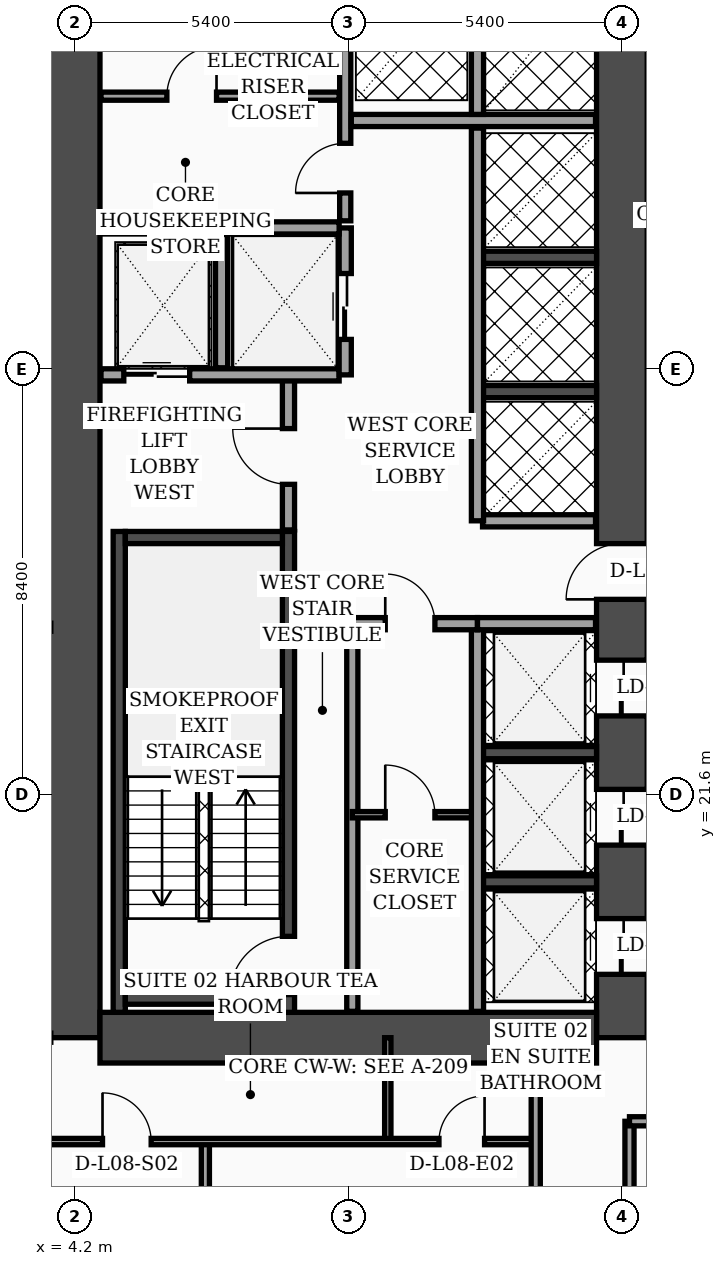
"""IFC4 building model, lengths in metres.
Left out: names, types, materials, properties, quantities, classifications, styles, units other than length and angle.
Written with IfcOpenShell. Run it as: python <this file> out.ifc"""

import sys

from ifc_helpers import new_model, si_unit, direction, frame, frame_2d, origin, place, context, subcontext, project, spatial, rectangle, extrude, element, fill, save


model = new_model("IFC4")
c1 = context("Model", 3, precision=1e-05, world=origin(), true_north=direction((0.0, 1.0)))
c2 = subcontext(c1, "Body", "Model", "MODEL_VIEW")
j1 = project(units=[si_unit("LENGTHUNIT", "METRE"), si_unit("PLANEANGLEUNIT", "RADIAN")], contexts=[c1])
p1 = place(None, origin())
s1 = spatial("IfcSite", under=j1, at=p1, CompositionType="ELEMENT")
p2 = place(p1, origin())
s2 = spatial("IfcBuilding", under=s1, at=p2, CompositionType="ELEMENT")
p3 = place(p2, frame((0.0, 0.0, 38.4)))
s3 = spatial("IfcBuildingStorey", under=s2, at=p3, CompositionType="ELEMENT", Elevation=38.4)
p4 = place(p3, frame((4.2, 16.8, 0.0), z_axis=(0.0, 0.0, 1.0), x_axis=(0.0, 1.0, 0.0)))
e1 = element("IfcWall", 1, at=p4, inside=s3, PredefinedType="SHEAR", context=c2, shape_type="SweptSolid", body=[
    extrude(rectangle(XDim=21.6, YDim=1.0, at=frame_2d((10.8, 0.0))), origin(), (0.0, 0.0, 1.0), 3.56),
])
p5 = place(p3, frame((15.0, 16.8, 0.0), z_axis=(0.0, 0.0, 1.0), x_axis=(0.0, 1.0, 0.0)))
e2 = element("IfcWall", 2, at=p5, inside=s3, PredefinedType="SHEAR", context=c2, shape_type="SweptSolid", body=[
    extrude(rectangle(XDim=21.6, YDim=1.0, at=frame_2d((10.8, 0.0))), origin(), (0.0, 0.0, 1.0), 3.56),
])
p6 = place(p5, frame((8.65, 0.0, 0.0)))
e3 = element("IfcOpeningElement", 3, at=p6, cuts=e2, PredefinedType="OPENING", context=c2, shape_type="SweptSolid", body=[
    extrude(rectangle(XDim=1.1, YDim=2.2, at=frame_2d((0.55, 1.1))), frame((0.0, 0.51, 0.0), z_axis=(0.0, -1.0, 0.0), x_axis=(1.0, 0.0, 0.0)), (0.0, 0.0, 1.0), 1.02),
])
p7 = place(p5, frame((1.25, 0.0, 0.0)))
e4 = element("IfcOpeningElement", 4, at=p7, cuts=e2, PredefinedType="OPENING", context=c2, shape_type="SweptSolid", body=[
    extrude(rectangle(XDim=1.1, YDim=2.2, at=frame_2d((0.55, 1.1))), frame((0.0, 0.51, 0.0), z_axis=(0.0, -1.0, 0.0), x_axis=(1.0, 0.0, 0.0)), (0.0, 0.0, 1.0), 1.02),
])
p8 = place(p5, frame((3.8, 0.0, 0.0)))
e5 = element("IfcOpeningElement", 5, at=p8, cuts=e2, PredefinedType="OPENING", context=c2, shape_type="SweptSolid", body=[
    extrude(rectangle(XDim=1.1, YDim=2.2, at=frame_2d((0.55, 1.1))), frame((0.0, 0.51, 0.0), z_axis=(0.0, -1.0, 0.0), x_axis=(1.0, 0.0, 0.0)), (0.0, 0.0, 1.0), 1.02),
])
p9 = place(p5, frame((6.35, 0.0, 0.0)))
e6 = element("IfcOpeningElement", 6, at=p9, cuts=e2, PredefinedType="OPENING", context=c2, shape_type="SweptSolid", body=[
    extrude(rectangle(XDim=1.1, YDim=2.2, at=frame_2d((0.55, 1.1))), frame((0.0, 0.51, 0.0), z_axis=(0.0, -1.0, 0.0), x_axis=(1.0, 0.0, 0.0)), (0.0, 0.0, 1.0), 1.02),
])
p10 = place(p3, frame((4.7, 16.8, 0.0), z_axis=(0.0, 0.0, 1.0), x_axis=(1.0, 0.0, 0.0)))
e7 = element("IfcWall", 7, at=p10, inside=s3, PredefinedType="SHEAR", context=c2, shape_type="SweptSolid", body=[
    extrude(rectangle(XDim=9.8, YDim=1.0, at=frame_2d((4.9, 0.0))), origin(), (0.0, 0.0, 1.0), 3.56),
])
p11 = place(p3, frame((5.08, 17.3, 0.0), z_axis=(0.0, 0.0, 1.0), x_axis=(0.0, 1.0, 0.0)))
e8 = element("IfcWall", 8, at=p11, inside=s3, PredefinedType="SOLIDWALL", context=c2, shape_type="SweptSolid", body=[
    extrude(rectangle(XDim=9.49, YDim=0.24, at=frame_2d((4.745, 0.0))), origin(), (0.0, 0.0, 1.0), 3.56),
])
p12 = place(p3, frame((8.42, 17.3, 0.0), z_axis=(0.0, 0.0, 1.0), x_axis=(0.0, 1.0, 0.0)))
e9 = element("IfcWall", 9, at=p12, inside=s3, PredefinedType="SOLIDWALL", context=c2, shape_type="SweptSolid", body=[
    extrude(rectangle(XDim=9.49, YDim=0.24, at=frame_2d((4.745, 0.0))), origin(), (0.0, 0.0, 1.0), 3.56),
])
p13 = place(p12, frame((0.35, 0.0, 0.0)))
e10 = element("IfcOpeningElement", 10, at=p13, cuts=e9, PredefinedType="OPENING", context=c2, shape_type="SweptSolid", body=[
    extrude(rectangle(XDim=1.15, YDim=2.2, at=frame_2d((0.575, 1.1))), frame((0.0, 0.13, 0.0), z_axis=(0.0, -1.0, 0.0), x_axis=(1.0, 0.0, 0.0)), (0.0, 0.0, 1.0), 0.26),
])
for number, where, z_axis, x_axis in (
    (11, (5.2, 17.58, 0.0), (0.0, 0.0, 1.0), (1.0, 0.0, 0.0)),
    (12, (5.2, 26.67, 0.0), (0.0, 0.0, 1.0), (1.0, 0.0, 0.0)),
):
    element("IfcWall", number, at=place(p3, frame(where, z_axis=z_axis, x_axis=x_axis)), inside=s3, PredefinedType="SOLIDWALL", context=c2, shape_type="SweptSolid", body=[
        extrude(rectangle(XDim=3.1, YDim=0.24, at=frame_2d((1.55, 0.0))), origin(), (0.0, 0.0, 1.0), 3.56),
    ])
for number, where, z_axis, x_axis in (
    (13, (12.18, 19.875, 0.0), (0.0, 0.0, 1.0), (1.0, 0.0, 0.0)),
    (14, (12.18, 22.425, 0.0), (0.0, 0.0, 1.0), (1.0, 0.0, 0.0)),
    (15, (12.18, 29.55, 0.0), (0.0, 0.0, 1.0), (1.0, 0.0, 0.0)),
    (16, (12.18, 32.2, 0.0), (0.0, 0.0, 1.0), (1.0, 0.0, 0.0)),
):
    element("IfcWall", number, at=place(p3, frame(where, z_axis=z_axis, x_axis=x_axis)), inside=s3, PredefinedType="SOLIDWALL", context=c2, shape_type="SweptSolid", body=[
        extrude(rectangle(XDim=2.32, YDim=0.24, at=frame_2d((1.16, 0.0))), origin(), (0.0, 0.0, 1.0), 3.56),
    ])
p14 = place(p3, frame((8.42, 26.82, 0.0), z_axis=(0.0, 0.0, 1.0), x_axis=(0.0, 1.0, 0.0)))
e17 = element("IfcWall", 17, at=p14, inside=s3, PredefinedType="SOLIDWALL", context=c2, shape_type="SweptSolid", body=[
    extrude(rectangle(XDim=3.0, YDim=0.24, at=frame_2d((1.5, 0.0))), origin(), (0.0, 0.0, 1.0), 3.56),
])
p15 = place(p14, frame((0.9, 0.0, 0.0)))
e18 = element("IfcOpeningElement", 18, at=p15, cuts=e17, PredefinedType="OPENING", context=c2, shape_type="SweptSolid", body=[
    extrude(rectangle(XDim=1.1, YDim=2.2, at=frame_2d((0.55, 1.1))), frame((0.0, 0.13, 0.0), z_axis=(0.0, -1.0, 0.0), x_axis=(1.0, 0.0, 0.0)), (0.0, 0.0, 1.0), 0.26),
])
p16 = place(p3, frame((4.72, 29.88, 0.0), z_axis=(0.0, 0.0, 1.0), x_axis=(1.0, 0.0, 0.0)))
e19 = element("IfcWall", 19, at=p16, inside=s3, PredefinedType="SOLIDWALL", context=c2, shape_type="SweptSolid", body=[
    extrude(rectangle(XDim=4.7, YDim=0.24, at=frame_2d((2.35, 0.0))), origin(), (0.0, 0.0, 1.0), 3.56),
])
p17 = place(p16, frame((0.45, 0.0, 0.0)))
e20 = element("IfcOpeningElement", 20, at=p17, cuts=e19, PredefinedType="OPENING", context=c2, shape_type="SweptSolid", body=[
    extrude(rectangle(XDim=1.3, YDim=2.35, at=frame_2d((0.65, 1.175))), frame((0.0, 0.13, 0.0), z_axis=(0.0, -1.0, 0.0), x_axis=(1.0, 0.0, 0.0)), (0.0, 0.0, 1.0), 0.26),
])
p18 = place(p3, frame((7.1, 30.02, 0.0), z_axis=(0.0, 0.0, 1.0), x_axis=(0.0, 1.0, 0.0)))
e21 = element("IfcWall", 21, at=p18, inside=s3, PredefinedType="SOLIDWALL", context=c2, shape_type="SweptSolid", body=[
    extrude(rectangle(XDim=2.63, YDim=0.24, at=frame_2d((1.315, 0.0))), origin(), (0.0, 0.0, 1.0), 3.56),
])
p19 = place(p3, frame((9.54, 29.88, 0.0), z_axis=(0.0, 0.0, 1.0), x_axis=(0.0, 1.0, 0.0)))
e22 = element("IfcWall", 22, at=p19, inside=s3, PredefinedType="SOLIDWALL", context=c2, shape_type="SweptSolid", body=[
    extrude(rectangle(XDim=2.9, YDim=0.24, at=frame_2d((1.45, 0.0))), origin(), (0.0, 0.0, 1.0), 3.56),
])
p20 = place(p19, frame((0.7, 0.0, 0.0)))
e23 = element("IfcOpeningElement", 23, at=p20, cuts=e22, PredefinedType="OPENING", context=c2, shape_type="SweptSolid", body=[
    extrude(rectangle(XDim=1.3, YDim=2.35, at=frame_2d((0.65, 1.175))), frame((0.0, 0.13, 0.0), z_axis=(0.0, -1.0, 0.0), x_axis=(1.0, 0.0, 0.0)), (0.0, 0.0, 1.0), 0.26),
])
p21 = place(p3, frame((4.72, 32.78, 0.0), z_axis=(0.0, 0.0, 1.0), x_axis=(1.0, 0.0, 0.0)))
e24 = element("IfcWall", 24, at=p21, inside=s3, PredefinedType="SOLIDWALL", context=c2, shape_type="SweptSolid", body=[
    extrude(rectangle(XDim=4.7, YDim=0.24, at=frame_2d((2.35, 0.0))), origin(), (0.0, 0.0, 1.0), 3.56),
])
p22 = place(p3, frame((9.68, 17.32, 0.0), z_axis=(0.0, 0.0, 1.0), x_axis=(0.0, 1.0, 0.0)))
e25 = element("IfcWall", 25, at=p22, inside=s3, PredefinedType="SOLIDWALL", context=c2, shape_type="SweptSolid", body=[
    extrude(rectangle(XDim=7.68, YDim=0.22, at=frame_2d((3.84, 0.0))), origin(), (0.0, 0.0, 1.0), 3.56),
])
p23 = place(p3, frame((4.72, 35.38, 0.0), z_axis=(0.0, 0.0, 1.0), x_axis=(1.0, 0.0, 0.0)))
e26 = element("IfcWall", 26, at=p23, inside=s3, PredefinedType="PARTITIONING", context=c2, shape_type="SweptSolid", body=[
    extrude(rectangle(XDim=4.7, YDim=0.16, at=frame_2d((2.35, 0.0))), origin(), (0.0, 0.0, 1.0), 3.56),
])
p24 = place(p23, frame((1.3, 0.0, 0.0)))
e27 = element("IfcOpeningElement", 27, at=p24, cuts=e26, PredefinedType="OPENING", context=c2, shape_type="SweptSolid", body=[
    extrude(rectangle(XDim=0.98, YDim=2.15, at=frame_2d((0.49, 1.075))), frame((0.0, 0.09, 0.0), z_axis=(0.0, -1.0, 0.0), x_axis=(1.0, 0.0, 0.0)), (0.0, 0.0, 1.0), 0.18),
])
p25 = place(p3, frame((9.54, 32.92, 0.0), z_axis=(0.0, 0.0, 1.0), x_axis=(0.0, 1.0, 0.0)))
e28 = element("IfcWall", 28, at=p25, inside=s3, PredefinedType="SOLIDWALL", context=c2, shape_type="SweptSolid", body=[
    extrude(rectangle(XDim=4.96, YDim=0.22, at=frame_2d((2.48, 0.0))), origin(), (0.0, 0.0, 1.0), 3.56),
])
p26 = place(p25, frame((0.55, 0.0, 0.0)))
e29 = element("IfcOpeningElement", 29, at=p26, cuts=e28, PredefinedType="OPENING", context=c2, shape_type="SweptSolid", body=[
    extrude(rectangle(XDim=0.98, YDim=2.15, at=frame_2d((0.49, 1.075))), frame((0.0, 0.12, 0.0), z_axis=(0.0, -1.0, 0.0), x_axis=(1.0, 0.0, 0.0)), (0.0, 0.0, 1.0), 0.24),
])
p27 = place(p3, frame((9.68, 21.2, 0.0), z_axis=(0.0, 0.0, 1.0), x_axis=(1.0, 0.0, 0.0)))
e30 = element("IfcWall", 30, at=p27, inside=s3, PredefinedType="PARTITIONING", context=c2, shape_type="SweptSolid", body=[
    extrude(rectangle(XDim=2.47, YDim=0.125, at=frame_2d((1.235, 0.0))), origin(), (0.0, 0.0, 1.0), 3.56),
])
p28 = place(p27, frame((0.65, 0.0, 0.0)))
e31 = element("IfcOpeningElement", 31, at=p28, cuts=e30, PredefinedType="OPENING", context=c2, shape_type="SweptSolid", body=[
    extrude(rectangle(XDim=0.98, YDim=2.15, at=frame_2d((0.49, 1.075))), frame((0.0, 0.073, 0.0), z_axis=(0.0, -1.0, 0.0), x_axis=(1.0, 0.0, 0.0)), (0.0, 0.0, 1.0), 0.145),
])
p29 = place(p3, frame((12.15, 17.32, 0.0), z_axis=(0.0, 0.0, 1.0), x_axis=(0.0, 1.0, 0.0)))
e32 = element("IfcWall", 32, at=p29, inside=s3, PredefinedType="SOLIDWALL", context=c2, shape_type="SweptSolid", body=[
    extrude(rectangle(XDim=7.65, YDim=0.24, at=frame_2d((3.825, 0.0))), origin(), (0.0, 0.0, 1.0), 3.56),
])
p30 = place(p3, frame((9.68, 24.97, 0.0), z_axis=(0.0, 0.0, 1.0), x_axis=(1.0, 0.0, 0.0)))
e33 = element("IfcWall", 33, at=p30, inside=s3, PredefinedType="SOLIDWALL", context=c2, shape_type="SweptSolid", body=[
    extrude(rectangle(XDim=2.47, YDim=0.24, at=frame_2d((1.235, 0.0))), origin(), (0.0, 0.0, 1.0), 3.56),
])
p31 = place(p30, frame((0.65, 0.0, 0.0)))
e34 = element("IfcOpeningElement", 34, at=p31, cuts=e33, PredefinedType="OPENING", context=c2, shape_type="SweptSolid", body=[
    extrude(rectangle(XDim=0.98, YDim=2.15, at=frame_2d((0.49, 1.075))), frame((0.0, 0.13, 0.0), z_axis=(0.0, -1.0, 0.0), x_axis=(1.0, 0.0, 0.0)), (0.0, 0.0, 1.0), 0.26),
])
p32 = place(p3, frame((12.15, 24.97, 0.0), z_axis=(0.0, 0.0, 1.0), x_axis=(1.0, 0.0, 0.0)))
e35 = element("IfcWall", 35, at=p32, inside=s3, PredefinedType="SOLIDWALL", context=c2, shape_type="SweptSolid", body=[
    extrude(rectangle(XDim=2.33, YDim=0.24, at=frame_2d((1.165, 0.0))), origin(), (0.0, 0.0, 1.0), 2.84),
])
p33 = place(p3, frame((12.25, 27.0, 0.0), z_axis=(0.0, 0.0, 1.0), x_axis=(1.0, 0.0, 0.0)))
e36 = element("IfcWall", 36, at=p33, inside=s3, PredefinedType="SOLIDWALL", context=c2, shape_type="SweptSolid", body=[
    extrude(rectangle(XDim=2.23, YDim=0.24, at=frame_2d((1.115, 0.0))), origin(), (0.0, 0.0, 1.0), 3.56),
])
p34 = place(p3, frame((12.15, 27.0, 0.0), z_axis=(0.0, 0.0, 1.0), x_axis=(0.0, 1.0, 0.0)))
e37 = element("IfcWall", 37, at=p34, inside=s3, PredefinedType="SOLIDWALL", context=c2, shape_type="SweptSolid", body=[
    extrude(rectangle(XDim=7.75, YDim=0.24, at=frame_2d((3.875, 0.0))), origin(), (0.0, 0.0, 1.0), 3.56),
])
p35 = place(p3, frame((9.66, 34.9, 0.0), z_axis=(0.0, 0.0, 1.0), x_axis=(1.0, 0.0, 0.0)))
e38 = element("IfcWall", 38, at=p35, inside=s3, PredefinedType="SOLIDWALL", context=c2, shape_type="SweptSolid", body=[
    extrude(rectangle(XDim=4.82, YDim=0.24, at=frame_2d((2.41, 0.0))), origin(), (0.0, 0.0, 1.0), 3.56),
])
p36 = place(p3, frame((12.15, 35.02, 0.0), z_axis=(0.0, 0.0, 1.0), x_axis=(0.0, 1.0, 0.0)))
e39 = element("IfcWall", 39, at=p36, inside=s3, PredefinedType="SOLIDWALL", context=c2, shape_type="SweptSolid", body=[
    extrude(rectangle(XDim=2.86, YDim=0.24, at=frame_2d((1.43, 0.0))), origin(), (0.0, 0.0, 1.0), 3.56),
])
p37 = place(p3, frame((10.38, 14.75, 0.0), z_axis=(0.0, 0.0, 1.0), x_axis=(0.0, 1.0, 0.0)))
e40 = element("IfcWall", 40, at=p37, inside=s3, PredefinedType="PARTITIONING", context=c2, shape_type="SweptSolid", body=[
    extrude(rectangle(XDim=2.05, YDim=0.125, at=frame_2d((1.025, 0.0))), origin(), (0.0, 0.0, 1.0), 3.56),
])
p38 = place(p3, frame((6.78, 9.5, 0.0), z_axis=(0.0, 0.0, 1.0), x_axis=(0.0, 1.0, 0.0)))
e41 = element("IfcWall", 41, at=p38, inside=s3, PredefinedType="PARTITIONING", context=c2, shape_type="SweptSolid", body=[
    extrude(rectangle(XDim=5.25, YDim=0.16, at=frame_2d((2.625, 0.0))), origin(), (0.0, 0.0, 1.0), 3.14),
])
p39 = place(p38, frame((2.15, 0.0, 0.0)))
e42 = element("IfcOpeningElement", 42, at=p39, cuts=e41, PredefinedType="OPENING", context=c2, shape_type="SweptSolid", body=[
    extrude(rectangle(XDim=0.96, YDim=2.2, at=frame_2d((0.48, 1.1))), frame((0.0, 0.09, 0.0), z_axis=(0.0, -1.0, 0.0), x_axis=(1.0, 0.0, 0.0)), (0.0, 0.0, 1.0), 0.18),
])
p40 = place(p3, frame((0.08, 14.75, 0.0), z_axis=(0.0, 0.0, 1.0), x_axis=(1.0, 0.0, 0.0)))
e43 = element("IfcWall", 43, at=p40, inside=s3, PredefinedType="PARTITIONING", context=c2, shape_type="SweptSolid", body=[
    extrude(rectangle(XDim=13.22, YDim=0.125, at=frame_2d((6.61, 0.0))), origin(), (0.0, 0.0, 1.0), 2.84),
])
p41 = place(p40, frame((4.67, 0.0, 0.0)))
e44 = element("IfcOpeningElement", 44, at=p41, cuts=e43, PredefinedType="OPENING", context=c2, shape_type="SweptSolid", body=[
    extrude(rectangle(XDim=0.96, YDim=2.2, at=frame_2d((0.48, 1.1))), frame((0.0, 0.073, 0.0), z_axis=(0.0, -1.0, 0.0), x_axis=(1.0, 0.0, 0.0)), (0.0, 0.0, 1.0), 0.145),
])
p42 = place(p40, frame((11.31, 0.0, 0.0)))
e45 = element("IfcOpeningElement", 45, at=p42, cuts=e43, PredefinedType="OPENING", context=c2, shape_type="SweptSolid", body=[
    extrude(rectangle(XDim=0.9, YDim=2.15, at=frame_2d((0.45, 1.075))), frame((0.0, 0.073, 0.0), z_axis=(0.0, -1.0, 0.0), x_axis=(1.0, 0.0, 0.0)), (0.0, 0.0, 1.0), 0.145),
])
p43 = place(p3, frame((13.3, 2.44, 0.0), z_axis=(0.0, 0.0, 1.0), x_axis=(0.0, 1.0, 0.0)))
e46 = element("IfcWall", 46, at=p43, inside=s3, PredefinedType="PARTITIONING", context=c2, shape_type="SweptSolid", body=[
    extrude(rectangle(XDim=14.36, YDim=0.18, at=frame_2d((7.18, 0.0))), origin(), (0.0, 0.0, 1.0), 3.04),
])
p44 = place(p43, frame((3.01, 0.0, 0.0)))
e47 = element("IfcOpeningElement", 47, at=p44, cuts=e46, PredefinedType="OPENING", context=c2, shape_type="SweptSolid", body=[
    extrude(rectangle(XDim=1.02, YDim=2.2, at=frame_2d((0.51, 1.1))), frame((0.0, 0.1, 0.0), z_axis=(0.0, -1.0, 0.0), x_axis=(1.0, 0.0, 0.0)), (0.0, 0.0, 1.0), 0.2),
])
p45 = place(p43, frame((9.18, 0.0, 0.0)))
e48 = element("IfcOpeningElement", 48, at=p45, cuts=e46, PredefinedType="OPENING", context=c2, shape_type="SweptSolid", body=[
    extrude(rectangle(XDim=1.02, YDim=2.2, at=frame_2d((0.51, 1.1))), frame((0.0, 0.1, 0.0), z_axis=(0.0, -1.0, 0.0), x_axis=(1.0, 0.0, 0.0)), (0.0, 0.0, 1.0), 0.2),
])
p46 = place(p3, frame((15.15, 2.44, 0.0), z_axis=(0.0, 0.0, 1.0), x_axis=(0.0, 1.0, 0.0)))
e49 = element("IfcWall", 49, at=p46, inside=s3, PredefinedType="PARTITIONING", context=c2, shape_type="SweptSolid", body=[
    extrude(rectangle(XDim=12.71, YDim=0.18, at=frame_2d((6.355, 0.0))), origin(), (0.0, 0.0, 1.0), 3.04),
])
p47 = place(p3, frame((15.15, 15.15, 0.0), z_axis=(0.0, 0.0, 1.0), x_axis=(1.0, 0.0, 0.0)))
e50 = element("IfcWall", 50, at=p47, inside=s3, PredefinedType="PARTITIONING", context=c2, shape_type="SweptSolid", body=[
    extrude(rectangle(XDim=6.45, YDim=0.18, at=frame_2d((3.225, 0.0))), origin(), (0.0, 0.0, 1.0), 2.34),
])
p48 = place(p47, frame((1.74, 0.0, 0.0)))
e51 = element("IfcOpeningElement", 51, at=p48, cuts=e50, PredefinedType="OPENING", context=c2, shape_type="SweptSolid", body=[
    extrude(rectangle(XDim=1.02, YDim=2.2, at=frame_2d((0.51, 1.1))), frame((0.0, 0.1, 0.0), z_axis=(0.0, -1.0, 0.0), x_axis=(1.0, 0.0, 0.0)), (0.0, 0.0, 1.0), 0.2),
])
p49 = place(p15, origin())
e52 = element("IfcDoor", 52, at=p49, inside=s3, OperationType="SINGLE_SWING_RIGHT", PredefinedType="DOOR", context=c2, shape_type="SweptSolid", body=[
    extrude(rectangle(XDim=1.1, YDim=2.2, at=frame_2d((0.55, 1.1))), frame((0.0, 0.025, 0.0), z_axis=(0.0, -1.0, 0.0), x_axis=(1.0, 0.0, 0.0)), (0.0, 0.0, 1.0), 0.05),
])
fill(e18, e52)
p50 = place(p17, origin())
e53 = element("IfcDoor", 53, at=p50, inside=s3, OperationType="DOUBLE_DOOR_SLIDING", PredefinedType="DOOR", context=c2, shape_type="SweptSolid", body=[
    extrude(rectangle(XDim=1.3, YDim=2.35, at=frame_2d((0.65, 1.175))), frame((0.0, 0.025, 0.0), z_axis=(0.0, -1.0, 0.0), x_axis=(1.0, 0.0, 0.0)), (0.0, 0.0, 1.0), 0.05),
])
fill(e20, e53)
p51 = place(p20, origin())
e54 = element("IfcDoor", 54, at=p51, inside=s3, OperationType="DOUBLE_DOOR_SLIDING", PredefinedType="DOOR", context=c2, shape_type="SweptSolid", body=[
    extrude(rectangle(XDim=1.3, YDim=2.35, at=frame_2d((0.65, 1.175))), frame((0.0, 0.025, 0.0), z_axis=(0.0, -1.0, 0.0), x_axis=(1.0, 0.0, 0.0)), (0.0, 0.0, 1.0), 0.05),
])
fill(e23, e54)
p52 = place(p24, origin())
e55 = element("IfcDoor", 55, at=p52, inside=s3, OperationType="SINGLE_SWING_RIGHT", PredefinedType="DOOR", context=c2, shape_type="SweptSolid", body=[
    extrude(rectangle(XDim=0.98, YDim=2.15, at=frame_2d((0.49, 1.075))), frame((0.0, 0.025, 0.0), z_axis=(0.0, -1.0, 0.0), x_axis=(1.0, 0.0, 0.0)), (0.0, 0.0, 1.0), 0.05),
])
fill(e27, e55)
p53 = place(p26, origin())
e56 = element("IfcDoor", 56, at=p53, inside=s3, OperationType="SINGLE_SWING_LEFT", PredefinedType="DOOR", context=c2, shape_type="SweptSolid", body=[
    extrude(rectangle(XDim=0.98, YDim=2.15, at=frame_2d((0.49, 1.075))), frame((0.0, 0.025, 0.0), z_axis=(0.0, -1.0, 0.0), x_axis=(1.0, 0.0, 0.0)), (0.0, 0.0, 1.0), 0.05),
])
fill(e29, e56)
p54 = place(p28, origin())
e57 = element("IfcDoor", 57, at=p54, inside=s3, OperationType="SINGLE_SWING_LEFT", PredefinedType="DOOR", context=c2, shape_type="SweptSolid", body=[
    extrude(rectangle(XDim=0.98, YDim=2.15, at=frame_2d((0.49, 1.075))), frame((0.0, 0.025, 0.0), z_axis=(0.0, -1.0, 0.0), x_axis=(1.0, 0.0, 0.0)), (0.0, 0.0, 1.0), 0.05),
])
fill(e31, e57)
p55 = place(p31, origin())
e58 = element("IfcDoor", 58, at=p55, inside=s3, OperationType="SINGLE_SWING_LEFT", PredefinedType="DOOR", context=c2, shape_type="SweptSolid", body=[
    extrude(rectangle(XDim=0.98, YDim=2.15, at=frame_2d((0.49, 1.075))), frame((0.0, 0.025, 0.0), z_axis=(0.0, -1.0, 0.0), x_axis=(1.0, 0.0, 0.0)), (0.0, 0.0, 1.0), 0.05),
])
fill(e34, e58)
p56 = place(p41, origin())
e59 = element("IfcDoor", 59, at=p56, inside=s3, OperationType="SINGLE_SWING_LEFT", PredefinedType="DOOR", context=c2, shape_type="SweptSolid", body=[
    extrude(rectangle(XDim=0.96, YDim=2.2, at=frame_2d((0.48, 1.1))), frame((0.0, 0.025, 0.0), z_axis=(0.0, -1.0, 0.0), x_axis=(1.0, 0.0, 0.0)), (0.0, 0.0, 1.0), 0.05),
])
fill(e44, e59)
p57 = place(p42, origin())
e60 = element("IfcDoor", 60, at=p57, inside=s3, OperationType="SINGLE_SWING_RIGHT", PredefinedType="DOOR", context=c2, shape_type="SweptSolid", body=[
    extrude(rectangle(XDim=0.9, YDim=2.15, at=frame_2d((0.45, 1.075))), frame((0.0, 0.025, 0.0), z_axis=(0.0, -1.0, 0.0), x_axis=(1.0, 0.0, 0.0)), (0.0, 0.0, 1.0), 0.05),
])
fill(e45, e60)
p58 = place(p13, origin())
e61 = element("IfcDoor", 61, at=p58, inside=s3, OperationType="SINGLE_SWING_LEFT", PredefinedType="DOOR", context=c2, shape_type="SweptSolid", body=[
    extrude(rectangle(XDim=1.15, YDim=2.2, at=frame_2d((0.575, 1.1))), frame((0.0, 0.025, 0.0), z_axis=(0.0, -1.0, 0.0), x_axis=(1.0, 0.0, 0.0)), (0.0, 0.0, 1.0), 0.05),
])
fill(e10, e61)
p59 = place(p6, origin())
e62 = element("IfcDoor", 62, at=p59, inside=s3, OperationType="SINGLE_SWING_LEFT", PredefinedType="DOOR", context=c2, shape_type="SweptSolid", body=[
    extrude(rectangle(XDim=1.1, YDim=2.2, at=frame_2d((0.55, 1.1))), frame((0.0, 0.025, 0.0), z_axis=(0.0, -1.0, 0.0), x_axis=(1.0, 0.0, 0.0)), (0.0, 0.0, 1.0), 0.05),
])
fill(e3, e62)
p60 = place(p7, origin())
e63 = element("IfcDoor", 63, at=p60, inside=s3, OperationType="DOUBLE_DOOR_SLIDING", PredefinedType="DOOR", context=c2, shape_type="SweptSolid", body=[
    extrude(rectangle(XDim=1.1, YDim=2.2, at=frame_2d((0.55, 1.1))), frame((0.0, 0.025, 0.0), z_axis=(0.0, -1.0, 0.0), x_axis=(1.0, 0.0, 0.0)), (0.0, 0.0, 1.0), 0.05),
])
fill(e4, e63)
p61 = place(p8, origin())
e64 = element("IfcDoor", 64, at=p61, inside=s3, OperationType="DOUBLE_DOOR_SLIDING", PredefinedType="DOOR", context=c2, shape_type="SweptSolid", body=[
    extrude(rectangle(XDim=1.1, YDim=2.2, at=frame_2d((0.55, 1.1))), frame((0.0, 0.025, 0.0), z_axis=(0.0, -1.0, 0.0), x_axis=(1.0, 0.0, 0.0)), (0.0, 0.0, 1.0), 0.05),
])
fill(e5, e64)
p62 = place(p9, origin())
e65 = element("IfcDoor", 65, at=p62, inside=s3, OperationType="DOUBLE_DOOR_SLIDING", PredefinedType="DOOR", context=c2, shape_type="SweptSolid", body=[
    extrude(rectangle(XDim=1.1, YDim=2.2, at=frame_2d((0.55, 1.1))), frame((0.0, 0.025, 0.0), z_axis=(0.0, -1.0, 0.0), x_axis=(1.0, 0.0, 0.0)), (0.0, 0.0, 1.0), 0.05),
])
fill(e6, e65)
save(model, sys.argv[1])
